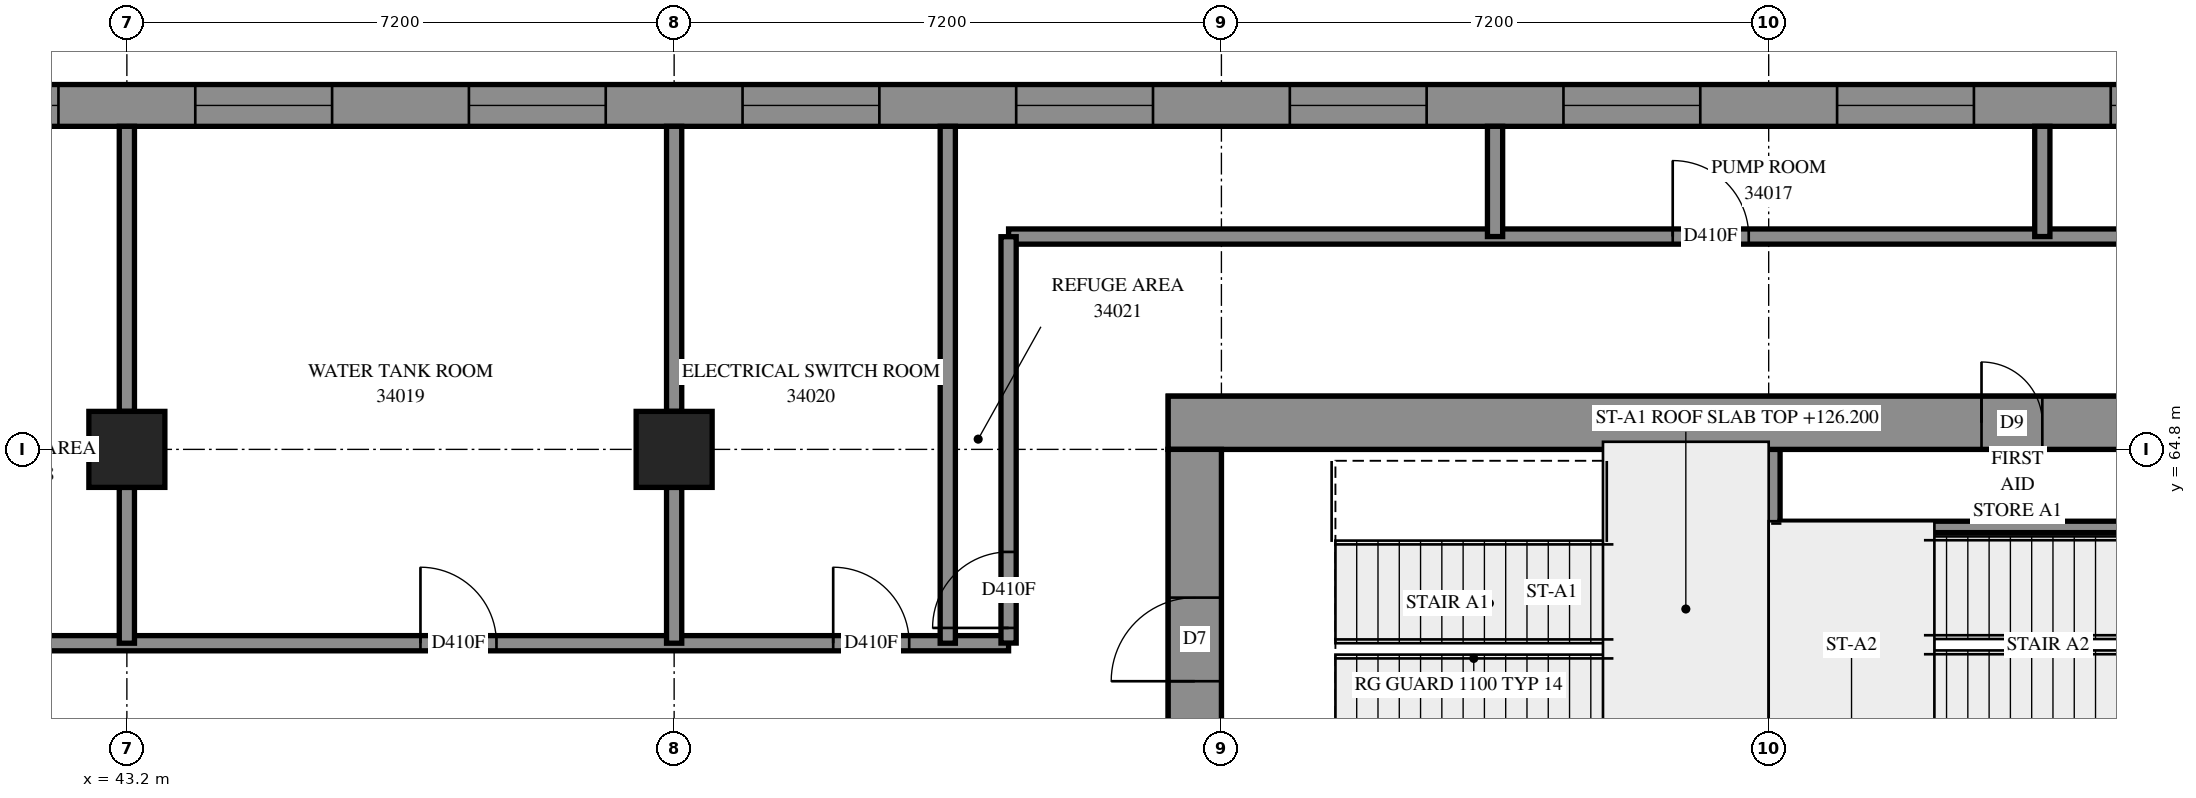
"""IFC4 building model, lengths in metres.
Left out: names, types, materials, properties, quantities, classifications, styles, units other than length and angle.
Written with IfcOpenShell. Run it as: python <this file> out.ifc"""

import sys

from ifc_helpers import new_model, si_unit, direction, frame, frame_2d, origin, origin_2d, place, context, subcontext, project, spatial, polyline, rectangle, outline, extrude, element, fill, save


model = new_model("IFC4")
c1 = context("Model", 3, precision=1e-05, world=origin(), true_north=direction((0.0, 1.0)))
c2 = subcontext(c1, "Body", "Model", "MODEL_VIEW")
j1 = project(units=[si_unit("LENGTHUNIT", "METRE"), si_unit("PLANEANGLEUNIT", "RADIAN")], contexts=[c1])
p1 = place(None, origin())
s1 = spatial("IfcSite", under=j1, at=p1, CompositionType="ELEMENT")
p2 = place(p1, origin())
s2 = spatial("IfcBuilding", under=s1, at=p2, CompositionType="ELEMENT")
p3 = place(p2, frame((0.0, 0.0, 126.2)))
s3 = spatial("IfcBuildingStorey", under=s2, at=p3, CompositionType="ELEMENT", Elevation=126.2)
for number, where, z_axis, x_axis in (
    (1, (43.2, 64.8, 0.0), (0.0, 0.0, 1.0), (1.0, 0.0, 0.0)),
    (2, (50.4, 64.8, 0.0), (0.0, 0.0, 1.0), (1.0, 0.0, 0.0)),
):
    element("IfcColumn", number, at=place(p3, frame(where, z_axis=z_axis, x_axis=x_axis)), inside=s3, PredefinedType="COLUMN", context=c2, shape_type="SweptSolid", body=[
        extrude(rectangle(XDim=1.0, YDim=1.0, at=origin_2d()), origin(), (0.0, 0.0, 1.0), 4.7),
    ])
p4 = place(p3, frame((56.9, 65.15, -0.3), z_axis=(0.0, 0.0, 1.0), x_axis=(1.0, 0.0, 0.0)))
e3 = element("IfcWall", 3, at=p4, inside=s3, PredefinedType="SHEAR", context=c2, shape_type="SweptSolid", body=[
    extrude(rectangle(XDim=15.8, YDim=0.7, at=frame_2d((7.9, 0.0))), origin(), (0.0, 0.0, 1.0), 4.3),
])
p5 = place(p4, frame((10.7, 0.0, 0.3)))
e4 = element("IfcOpeningElement", 4, at=p5, cuts=e3, PredefinedType="OPENING", context=c2, shape_type="SweptSolid", body=[
    extrude(rectangle(XDim=0.8, YDim=2.1, at=frame_2d((0.4, 1.05))), frame((0.0, 0.36, 0.0), z_axis=(0.0, -1.0, 0.0), x_axis=(1.0, 0.0, 0.0)), (0.0, 0.0, 1.0), 0.72),
])
p6 = place(p3, frame((57.25, 50.4, -0.3), z_axis=(0.0, 0.0, 1.0), x_axis=(0.0, 1.0, 0.0)))
e5 = element("IfcWall", 5, at=p6, inside=s3, PredefinedType="SHEAR", context=c2, shape_type="SweptSolid", body=[
    extrude(rectangle(XDim=14.4, YDim=0.7, at=frame_2d((7.2, 0.0))), origin(), (0.0, 0.0, 1.0), 4.3),
])
p7 = place(p6, frame((4.55, 0.0, 0.3)))
e6 = element("IfcOpeningElement", 6, at=p7, cuts=e5, PredefinedType="OPENING", context=c2, shape_type="SweptSolid", body=[
    extrude(rectangle(XDim=1.1, YDim=2.1, at=frame_2d((0.55, 1.05))), frame((0.0, 0.36, 0.0), z_axis=(0.0, -1.0, 0.0), x_axis=(1.0, 0.0, 0.0)), (0.0, 0.0, 1.0), 0.72),
])
p8 = place(p6, frame((11.35, 0.0, 0.3)))
e7 = element("IfcOpeningElement", 7, at=p8, cuts=e5, PredefinedType="OPENING", context=c2, shape_type="SweptSolid", body=[
    extrude(rectangle(XDim=1.1, YDim=2.1, at=frame_2d((0.55, 1.05))), frame((0.0, 0.36, 0.0), z_axis=(0.0, -1.0, 0.0), x_axis=(1.0, 0.0, 0.0)), (0.0, 0.0, 1.0), 0.72),
])
p9 = place(p3, frame((64.8, 60.6, 0.0), z_axis=(0.0, 0.0, 1.0), x_axis=(0.0, 1.0, 0.0)))
e8 = element("IfcWall", 8, at=p9, inside=s3, PredefinedType="SOLIDWALL", context=c2, shape_type="SweptSolid", body=[
    extrude(rectangle(XDim=4.2, YDim=0.3, at=frame_2d((2.1, 0.0))), origin(), (0.0, 0.0, 1.0), 4.7),
])
p10 = place(p3, frame((78.092, 69.325, 0.0), z_axis=(0.0, 0.0, 1.0), x_axis=(-1.0, 0.0, 0.0)))
e9 = element("IfcWall", 9, at=p10, inside=s3, PredefinedType="SOLIDWALL", context=c2, shape_type="SweptSolid", body=[
    extrude(outline(polyline([(-0.114, -0.275), (54.092, -0.275), (53.542, 0.275), (0.114, 0.275), (-0.114, -0.275)])), origin(), (0.0, 0.0, 1.0), 4.7),
])
p11 = place(p10, frame((0.503, 0.0, 0.9)))
e10 = element("IfcOpeningElement", 10, at=p11, cuts=e9, PredefinedType="OPENING", context=c2, shape_type="SweptSolid", body=[
    extrude(rectangle(XDim=1.8, YDim=2.4, at=frame_2d((0.9, 1.2))), frame((0.0, 0.285, 0.0), z_axis=(0.0, -1.0, 0.0), x_axis=(1.0, 0.0, 0.0)), (0.0, 0.0, 1.0), 0.57),
])
p12 = place(p10, frame((3.392, 0.0, 0.9)))
e11 = element("IfcOpeningElement", 11, at=p12, cuts=e9, PredefinedType="OPENING", context=c2, shape_type="SweptSolid", body=[
    extrude(rectangle(XDim=1.8, YDim=2.4, at=frame_2d((0.9, 1.2))), frame((0.0, 0.285, 0.0), z_axis=(0.0, -1.0, 0.0), x_axis=(1.0, 0.0, 0.0)), (0.0, 0.0, 1.0), 0.57),
])
p13 = place(p10, frame((6.992, 0.0, 0.9)))
e12 = element("IfcOpeningElement", 12, at=p13, cuts=e9, PredefinedType="OPENING", context=c2, shape_type="SweptSolid", body=[
    extrude(rectangle(XDim=1.8, YDim=2.4, at=frame_2d((0.9, 1.2))), frame((0.0, 0.285, 0.0), z_axis=(0.0, -1.0, 0.0), x_axis=(1.0, 0.0, 0.0)), (0.0, 0.0, 1.0), 0.57),
])
p14 = place(p10, frame((10.592, 0.0, 0.9)))
e13 = element("IfcOpeningElement", 13, at=p14, cuts=e9, PredefinedType="OPENING", context=c2, shape_type="SweptSolid", body=[
    extrude(rectangle(XDim=1.8, YDim=2.4, at=frame_2d((0.9, 1.2))), frame((0.0, 0.285, 0.0), z_axis=(0.0, -1.0, 0.0), x_axis=(1.0, 0.0, 0.0)), (0.0, 0.0, 1.0), 0.57),
])
p15 = place(p10, frame((14.192, 0.0, 0.9)))
e14 = element("IfcOpeningElement", 14, at=p15, cuts=e9, PredefinedType="OPENING", context=c2, shape_type="SweptSolid", body=[
    extrude(rectangle(XDim=1.8, YDim=2.4, at=frame_2d((0.9, 1.2))), frame((0.0, 0.285, 0.0), z_axis=(0.0, -1.0, 0.0), x_axis=(1.0, 0.0, 0.0)), (0.0, 0.0, 1.0), 0.57),
])
p16 = place(p10, frame((17.792, 0.0, 0.9)))
e15 = element("IfcOpeningElement", 15, at=p16, cuts=e9, PredefinedType="OPENING", context=c2, shape_type="SweptSolid", body=[
    extrude(rectangle(XDim=1.8, YDim=2.4, at=frame_2d((0.9, 1.2))), frame((0.0, 0.285, 0.0), z_axis=(0.0, -1.0, 0.0), x_axis=(1.0, 0.0, 0.0)), (0.0, 0.0, 1.0), 0.57),
])
p17 = place(p10, frame((21.392, 0.0, 0.9)))
e16 = element("IfcOpeningElement", 16, at=p17, cuts=e9, PredefinedType="OPENING", context=c2, shape_type="SweptSolid", body=[
    extrude(rectangle(XDim=1.8, YDim=2.4, at=frame_2d((0.9, 1.2))), frame((0.0, 0.285, 0.0), z_axis=(0.0, -1.0, 0.0), x_axis=(1.0, 0.0, 0.0)), (0.0, 0.0, 1.0), 0.57),
])
p18 = place(p10, frame((24.992, 0.0, 0.9)))
e17 = element("IfcOpeningElement", 17, at=p18, cuts=e9, PredefinedType="OPENING", context=c2, shape_type="SweptSolid", body=[
    extrude(rectangle(XDim=1.8, YDim=2.4, at=frame_2d((0.9, 1.2))), frame((0.0, 0.285, 0.0), z_axis=(0.0, -1.0, 0.0), x_axis=(1.0, 0.0, 0.0)), (0.0, 0.0, 1.0), 0.57),
])
p19 = place(p10, frame((28.592, 0.0, 0.9)))
e18 = element("IfcOpeningElement", 18, at=p19, cuts=e9, PredefinedType="OPENING", context=c2, shape_type="SweptSolid", body=[
    extrude(rectangle(XDim=1.8, YDim=2.4, at=frame_2d((0.9, 1.2))), frame((0.0, 0.285, 0.0), z_axis=(0.0, -1.0, 0.0), x_axis=(1.0, 0.0, 0.0)), (0.0, 0.0, 1.0), 0.57),
])
p20 = place(p10, frame((32.192, 0.0, 0.9)))
e19 = element("IfcOpeningElement", 19, at=p20, cuts=e9, PredefinedType="OPENING", context=c2, shape_type="SweptSolid", body=[
    extrude(rectangle(XDim=1.8, YDim=2.4, at=frame_2d((0.9, 1.2))), frame((0.0, 0.285, 0.0), z_axis=(0.0, -1.0, 0.0), x_axis=(1.0, 0.0, 0.0)), (0.0, 0.0, 1.0), 0.57),
])
p21 = place(p10, frame((35.792, 0.0, 0.9)))
e20 = element("IfcOpeningElement", 20, at=p21, cuts=e9, PredefinedType="OPENING", context=c2, shape_type="SweptSolid", body=[
    extrude(rectangle(XDim=1.8, YDim=2.4, at=frame_2d((0.9, 1.2))), frame((0.0, 0.285, 0.0), z_axis=(0.0, -1.0, 0.0), x_axis=(1.0, 0.0, 0.0)), (0.0, 0.0, 1.0), 0.57),
])
p22 = place(p10, frame((39.392, 0.0, 0.9)))
e21 = element("IfcOpeningElement", 21, at=p22, cuts=e9, PredefinedType="OPENING", context=c2, shape_type="SweptSolid", body=[
    extrude(rectangle(XDim=1.8, YDim=2.4, at=frame_2d((0.9, 1.2))), frame((0.0, 0.285, 0.0), z_axis=(0.0, -1.0, 0.0), x_axis=(1.0, 0.0, 0.0)), (0.0, 0.0, 1.0), 0.57),
])
p23 = place(p10, frame((42.992, 0.0, 0.9)))
e22 = element("IfcOpeningElement", 22, at=p23, cuts=e9, PredefinedType="OPENING", context=c2, shape_type="SweptSolid", body=[
    extrude(rectangle(XDim=1.8, YDim=2.4, at=frame_2d((0.9, 1.2))), frame((0.0, 0.285, 0.0), z_axis=(0.0, -1.0, 0.0), x_axis=(1.0, 0.0, 0.0)), (0.0, 0.0, 1.0), 0.57),
])
p24 = place(p10, frame((46.592, 0.0, 0.9)))
e23 = element("IfcOpeningElement", 23, at=p24, cuts=e9, PredefinedType="OPENING", context=c2, shape_type="SweptSolid", body=[
    extrude(rectangle(XDim=1.8, YDim=2.4, at=frame_2d((0.9, 1.2))), frame((0.0, 0.285, 0.0), z_axis=(0.0, -1.0, 0.0), x_axis=(1.0, 0.0, 0.0)), (0.0, 0.0, 1.0), 0.57),
])
p25 = place(p10, frame((50.192, 0.0, 0.9)))
e24 = element("IfcOpeningElement", 24, at=p25, cuts=e9, PredefinedType="OPENING", context=c2, shape_type="SweptSolid", body=[
    extrude(rectangle(XDim=1.8, YDim=2.4, at=frame_2d((0.9, 1.2))), frame((0.0, 0.285, 0.0), z_axis=(0.0, -1.0, 0.0), x_axis=(1.0, 0.0, 0.0)), (0.0, 0.0, 1.0), 0.57),
])
p26 = place(p3, frame((64.95, 63.78, 0.0), z_axis=(0.0, 0.0, 1.0), x_axis=(1.0, 0.0, 0.0)))
e25 = element("IfcWall", 25, at=p26, inside=s3, PredefinedType="PARTITIONING", context=c2, shape_type="SweptSolid", body=[
    extrude(rectangle(XDim=6.25, YDim=0.15, at=frame_2d((3.125, 0.0))), origin(), (0.0, 0.0, 1.0), 4.7),
])
p27 = place(p3, frame((54.8, 67.6, 0.0), z_axis=(0.0, 0.0, 1.0), x_axis=(1.0, 0.0, 0.0)))
e26 = element("IfcWall", 26, at=p27, inside=s3, PredefinedType="PARTITIONING", context=c2, shape_type="SweptSolid", body=[
    extrude(rectangle(XDim=19.998, YDim=0.2, at=frame_2d((9.999, 0.0))), origin(), (0.0, 0.0, 1.0), 4.7),
])
p28 = place(p27, frame((8.738, 0.0, 0.0)))
e27 = element("IfcOpeningElement", 27, at=p28, cuts=e26, PredefinedType="OPENING", context=c2, shape_type="SweptSolid", body=[
    extrude(rectangle(XDim=1.0, YDim=2.1, at=frame_2d((0.5, 1.05))), frame((0.0, 0.11, 0.0), z_axis=(0.0, -1.0, 0.0), x_axis=(1.0, 0.0, 0.0)), (0.0, 0.0, 1.0), 0.22),
])
p29 = place(p3, frame((40.652, 62.25, 0.0), z_axis=(0.0, 0.0, 1.0), x_axis=(1.0, 0.0, 0.0)))
e28 = element("IfcWall", 28, at=p29, inside=s3, PredefinedType="PARTITIONING", context=c2, shape_type="SweptSolid", body=[
    extrude(rectangle(XDim=14.148, YDim=0.2, at=frame_2d((7.074, 0.0))), origin(), (0.0, 0.0, 1.0), 4.7),
])
p30 = place(p29, frame((6.41, 0.0, 0.0)))
e29 = element("IfcOpeningElement", 29, at=p30, cuts=e28, PredefinedType="OPENING", context=c2, shape_type="SweptSolid", body=[
    extrude(rectangle(XDim=1.0, YDim=2.1, at=frame_2d((0.5, 1.05))), frame((0.0, 0.11, 0.0), z_axis=(0.0, -1.0, 0.0), x_axis=(1.0, 0.0, 0.0)), (0.0, 0.0, 1.0), 0.22),
])
p31 = place(p29, frame((11.841, 0.0, 0.0)))
e30 = element("IfcOpeningElement", 30, at=p31, cuts=e28, PredefinedType="OPENING", context=c2, shape_type="SweptSolid", body=[
    extrude(rectangle(XDim=1.0, YDim=2.1, at=frame_2d((0.5, 1.05))), frame((0.0, 0.11, 0.0), z_axis=(0.0, -1.0, 0.0), x_axis=(1.0, 0.0, 0.0)), (0.0, 0.0, 1.0), 0.22),
])
p32 = place(p3, frame((54.0, 62.25, 0.0), z_axis=(0.0, 0.0, 1.0), x_axis=(0.0, 1.0, 0.0)))
e31 = element("IfcWall", 31, at=p32, inside=s3, PredefinedType="PARTITIONING", context=c2, shape_type="SweptSolid", body=[
    extrude(rectangle(XDim=6.8, YDim=0.2, at=frame_2d((3.4, 0.0))), origin(), (0.0, 0.0, 1.0), 4.7),
])
p33 = place(p3, frame((54.8, 62.252, 0.0), z_axis=(0.0, 0.0, 1.0), x_axis=(0.0, 1.0, 0.0)))
e32 = element("IfcWall", 32, at=p33, inside=s3, PredefinedType="PARTITIONING", context=c2, shape_type="SweptSolid", body=[
    extrude(rectangle(XDim=5.346, YDim=0.2, at=frame_2d((2.673, 0.0))), origin(), (0.0, 0.0, 1.0), 4.7),
])
p34 = place(p33, frame((0.199, 0.0, 0.0)))
e33 = element("IfcOpeningElement", 33, at=p34, cuts=e32, PredefinedType="OPENING", context=c2, shape_type="SweptSolid", body=[
    extrude(rectangle(XDim=1.0, YDim=2.1, at=frame_2d((0.5, 1.05))), frame((0.0, 0.11, 0.0), z_axis=(0.0, -1.0, 0.0), x_axis=(1.0, 0.0, 0.0)), (0.0, 0.0, 1.0), 0.22),
])
for number, where, z_axis, x_axis in (
    (34, (43.2, 65.3, 0.0), (0.0, 0.0, 1.0), (0.0, 1.0, 0.0)),
    (35, (50.4, 65.3, 0.0), (0.0, 0.0, 1.0), (0.0, 1.0, 0.0)),
):
    element("IfcWall", number, at=place(p3, frame(where, z_axis=z_axis, x_axis=x_axis)), inside=s3, PredefinedType="PARTITIONING", context=c2, shape_type="SweptSolid", body=[
        extrude(rectangle(XDim=3.75, YDim=0.2, at=frame_2d((1.875, 0.0))), origin(), (0.0, 0.0, 1.0), 4.7),
    ])
for number, where, z_axis, x_axis in (
    (36, (43.2, 62.25, 0.0), (0.0, 0.0, 1.0), (0.0, 1.0, 0.0)),
    (37, (50.4, 62.25, 0.0), (0.0, 0.0, 1.0), (0.0, 1.0, 0.0)),
):
    element("IfcWall", number, at=place(p3, frame(where, z_axis=z_axis, x_axis=x_axis)), inside=s3, PredefinedType="PARTITIONING", context=c2, shape_type="SweptSolid", body=[
        extrude(rectangle(XDim=2.05, YDim=0.2, at=frame_2d((1.025, 0.0))), origin(), (0.0, 0.0, 1.0), 4.7),
    ])
for number, where, z_axis, x_axis in (
    (38, (61.2, 67.6, 0.0), (0.0, 0.0, 1.0), (0.0, 1.0, 0.0)),
    (39, (68.4, 67.6, 0.0), (0.0, 0.0, 1.0), (0.0, 1.0, 0.0)),
):
    element("IfcWall", number, at=place(p3, frame(where, z_axis=z_axis, x_axis=x_axis)), inside=s3, PredefinedType="PARTITIONING", context=c2, shape_type="SweptSolid", body=[
        extrude(rectangle(XDim=1.45, YDim=0.2, at=frame_2d((0.725, 0.0))), origin(), (0.0, 0.0, 1.0), 4.7),
    ])
p35 = place(p13, origin())
e40 = element("IfcWindow", 40, at=p35, inside=s3, PartitioningType="SINGLE_PANEL", PredefinedType="WINDOW", context=c2, shape_type="SweptSolid", body=[
    extrude(rectangle(XDim=1.8, YDim=2.4, at=frame_2d((0.9, 1.2))), frame((0.0, 0.155, 0.0), z_axis=(0.0, -1.0, 0.0), x_axis=(1.0, 0.0, 0.0)), (0.0, 0.0, 1.0), 0.06),
])
fill(e12, e40)
p36 = place(p14, origin())
e41 = element("IfcWindow", 41, at=p36, inside=s3, PartitioningType="SINGLE_PANEL", PredefinedType="WINDOW", context=c2, shape_type="SweptSolid", body=[
    extrude(rectangle(XDim=1.8, YDim=2.4, at=frame_2d((0.9, 1.2))), frame((0.0, 0.155, 0.0), z_axis=(0.0, -1.0, 0.0), x_axis=(1.0, 0.0, 0.0)), (0.0, 0.0, 1.0), 0.06),
])
fill(e13, e41)
p37 = place(p15, origin())
e42 = element("IfcWindow", 42, at=p37, inside=s3, PartitioningType="SINGLE_PANEL", PredefinedType="WINDOW", context=c2, shape_type="SweptSolid", body=[
    extrude(rectangle(XDim=1.8, YDim=2.4, at=frame_2d((0.9, 1.2))), frame((0.0, 0.155, 0.0), z_axis=(0.0, -1.0, 0.0), x_axis=(1.0, 0.0, 0.0)), (0.0, 0.0, 1.0), 0.06),
])
fill(e14, e42)
p38 = place(p16, origin())
e43 = element("IfcWindow", 43, at=p38, inside=s3, PartitioningType="SINGLE_PANEL", PredefinedType="WINDOW", context=c2, shape_type="SweptSolid", body=[
    extrude(rectangle(XDim=1.8, YDim=2.4, at=frame_2d((0.9, 1.2))), frame((0.0, 0.155, 0.0), z_axis=(0.0, -1.0, 0.0), x_axis=(1.0, 0.0, 0.0)), (0.0, 0.0, 1.0), 0.06),
])
fill(e15, e43)
p39 = place(p17, origin())
e44 = element("IfcWindow", 44, at=p39, inside=s3, PartitioningType="SINGLE_PANEL", PredefinedType="WINDOW", context=c2, shape_type="SweptSolid", body=[
    extrude(rectangle(XDim=1.8, YDim=2.4, at=frame_2d((0.9, 1.2))), frame((0.0, 0.155, 0.0), z_axis=(0.0, -1.0, 0.0), x_axis=(1.0, 0.0, 0.0)), (0.0, 0.0, 1.0), 0.06),
])
fill(e16, e44)
p40 = place(p18, origin())
e45 = element("IfcWindow", 45, at=p40, inside=s3, PartitioningType="SINGLE_PANEL", PredefinedType="WINDOW", context=c2, shape_type="SweptSolid", body=[
    extrude(rectangle(XDim=1.8, YDim=2.4, at=frame_2d((0.9, 1.2))), frame((0.0, 0.155, 0.0), z_axis=(0.0, -1.0, 0.0), x_axis=(1.0, 0.0, 0.0)), (0.0, 0.0, 1.0), 0.06),
])
fill(e17, e45)
p41 = place(p19, origin())
e46 = element("IfcWindow", 46, at=p41, inside=s3, PartitioningType="SINGLE_PANEL", PredefinedType="WINDOW", context=c2, shape_type="SweptSolid", body=[
    extrude(rectangle(XDim=1.8, YDim=2.4, at=frame_2d((0.9, 1.2))), frame((0.0, 0.155, 0.0), z_axis=(0.0, -1.0, 0.0), x_axis=(1.0, 0.0, 0.0)), (0.0, 0.0, 1.0), 0.06),
])
fill(e18, e46)
p42 = place(p20, origin())
e47 = element("IfcWindow", 47, at=p42, inside=s3, PartitioningType="SINGLE_PANEL", PredefinedType="WINDOW", context=c2, shape_type="SweptSolid", body=[
    extrude(rectangle(XDim=1.8, YDim=2.4, at=frame_2d((0.9, 1.2))), frame((0.0, 0.155, 0.0), z_axis=(0.0, -1.0, 0.0), x_axis=(1.0, 0.0, 0.0)), (0.0, 0.0, 1.0), 0.06),
])
fill(e19, e47)
p43 = place(p21, origin())
e48 = element("IfcWindow", 48, at=p43, inside=s3, PartitioningType="SINGLE_PANEL", PredefinedType="WINDOW", context=c2, shape_type="SweptSolid", body=[
    extrude(rectangle(XDim=1.8, YDim=2.4, at=frame_2d((0.9, 1.2))), frame((0.0, 0.155, 0.0), z_axis=(0.0, -1.0, 0.0), x_axis=(1.0, 0.0, 0.0)), (0.0, 0.0, 1.0), 0.06),
])
fill(e20, e48)
p44 = place(p5, origin())
e49 = element("IfcDoor", 49, at=p44, inside=s3, OperationType="SINGLE_SWING_RIGHT", PredefinedType="DOOR", context=c2, shape_type="SweptSolid", body=[
    extrude(rectangle(XDim=0.8, YDim=2.1, at=frame_2d((0.4, 1.05))), frame((0.0, -0.29, 0.0), z_axis=(0.0, -1.0, 0.0), x_axis=(1.0, 0.0, 0.0)), (0.0, 0.0, 1.0), 0.05),
])
fill(e4, e49)
p45 = place(p8, origin())
e50 = element("IfcDoor", 50, at=p45, inside=s3, OperationType="SINGLE_SWING_LEFT", PredefinedType="DOOR", context=c2, shape_type="SweptSolid", body=[
    extrude(rectangle(XDim=1.1, YDim=2.1, at=frame_2d((0.55, 1.05))), frame((0.0, 0.025, 0.0), z_axis=(0.0, -1.0, 0.0), x_axis=(1.0, 0.0, 0.0)), (0.0, 0.0, 1.0), 0.05),
])
fill(e7, e50)
p46 = place(p28, origin())
e51 = element("IfcDoor", 51, at=p46, inside=s3, OperationType="SINGLE_SWING_LEFT", PredefinedType="DOOR", context=c2, shape_type="SweptSolid", body=[
    extrude(rectangle(XDim=1.0, YDim=2.1, at=frame_2d((0.5, 1.05))), frame((0.0, 0.025, 0.0), z_axis=(0.0, -1.0, 0.0), x_axis=(1.0, 0.0, 0.0)), (0.0, 0.0, 1.0), 0.05),
])
fill(e27, e51)
p47 = place(p30, origin())
e52 = element("IfcDoor", 52, at=p47, inside=s3, OperationType="SINGLE_SWING_RIGHT", PredefinedType="DOOR", context=c2, shape_type="SweptSolid", body=[
    extrude(rectangle(XDim=1.0, YDim=2.1, at=frame_2d((0.5, 1.05))), frame((0.0, 0.025, 0.0), z_axis=(0.0, -1.0, 0.0), x_axis=(1.0, 0.0, 0.0)), (0.0, 0.0, 1.0), 0.05),
])
fill(e29, e52)
p48 = place(p31, origin())
e53 = element("IfcDoor", 53, at=p48, inside=s3, OperationType="SINGLE_SWING_RIGHT", PredefinedType="DOOR", context=c2, shape_type="SweptSolid", body=[
    extrude(rectangle(XDim=1.0, YDim=2.1, at=frame_2d((0.5, 1.05))), frame((0.0, 0.025, 0.0), z_axis=(0.0, -1.0, 0.0), x_axis=(1.0, 0.0, 0.0)), (0.0, 0.0, 1.0), 0.05),
])
fill(e30, e53)
p49 = place(p34, origin())
e54 = element("IfcDoor", 54, at=p49, inside=s3, OperationType="SINGLE_SWING_LEFT", PredefinedType="DOOR", context=c2, shape_type="SweptSolid", body=[
    extrude(rectangle(XDim=1.0, YDim=2.1, at=frame_2d((0.5, 1.05))), frame((0.0, 0.025, 0.0), z_axis=(0.0, -1.0, 0.0), x_axis=(1.0, 0.0, 0.0)), (0.0, 0.0, 1.0), 0.05),
])
fill(e33, e54)
save(model, sys.argv[1])
